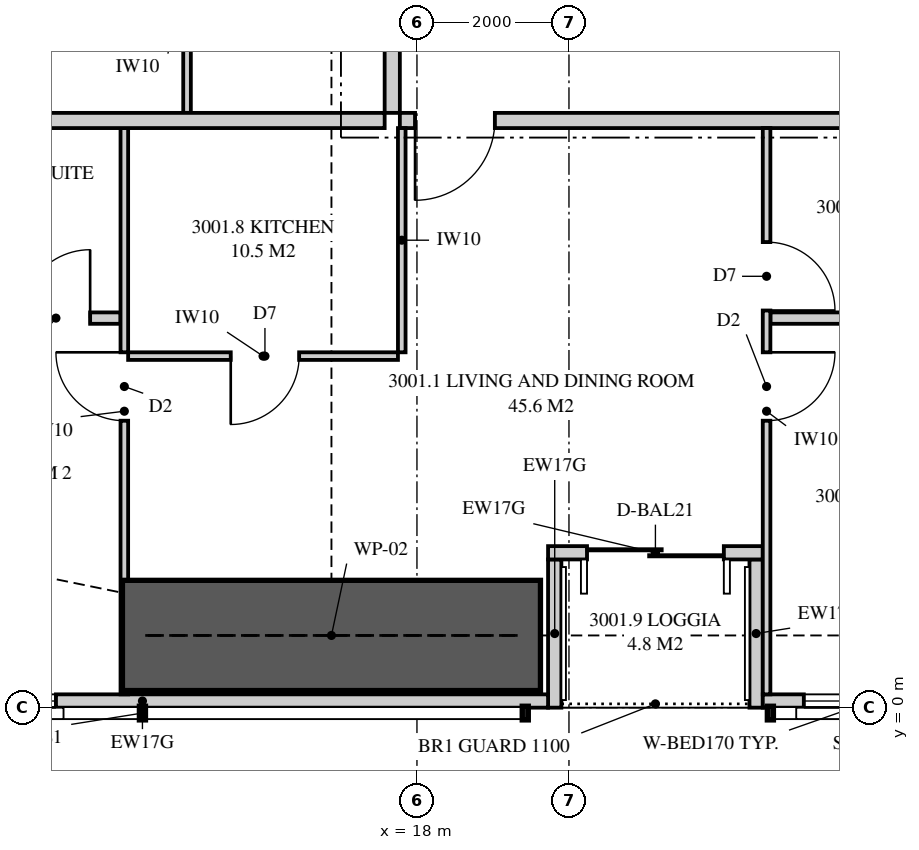
"""IFC4 building model, lengths in metres.
Left out: names, types, materials, properties, quantities, classifications, styles, units other than length and angle.
Written with IfcOpenShell. Run it as: python <this file> out.ifc"""

import sys

from ifc_helpers import new_model, si_unit, direction, frame, frame_2d, origin, place, context, subcontext, project, spatial, polyline, rectangle, outline, extrude, element, fill, save


model = new_model("IFC4")
c1 = context("Model", 3, precision=1e-05, world=origin(), true_north=direction((0.0, 1.0)))
c2 = subcontext(c1, "Body", "Model", "MODEL_VIEW")
j1 = project(units=[si_unit("LENGTHUNIT", "METRE"), si_unit("PLANEANGLEUNIT", "RADIAN")], contexts=[c1])
p1 = place(None, origin())
s1 = spatial("IfcSite", under=j1, at=p1, CompositionType="ELEMENT")
p2 = place(p1, origin())
s2 = spatial("IfcBuilding", under=s1, at=p2, CompositionType="ELEMENT")
p3 = place(p2, frame((0.0, 0.0, 111.55)))
s3 = spatial("IfcBuildingStorey", under=s2, at=p3, CompositionType="ELEMENT", Elevation=111.55)
p4 = place(p3, frame((9.051, 0.087, 0.0), z_axis=(0.0, 0.0, 1.0), x_axis=(1.0, 0.0, 0.0)))
e1 = element("IfcWall", 1, at=p4, inside=s3, PredefinedType="SOLIDWALL", context=c2, shape_type="SweptSolid", body=[
    extrude(outline(polyline([(0.0, 0.0), (10.674, 0.0), (10.674, 2.15), (7.824, 2.15), (7.824, 3.11), (7.666, 3.11), (7.666, 2.15), (7.62, 2.15), (7.62, 3.11), (0.0, 3.11), (0.0, 0.0)])), frame((0.0, 0.087, 0.0), z_axis=(0.0, -1.0, 0.0), x_axis=(1.0, 0.0, 0.0)), (0.0, 0.0, 1.0), 0.175),
])
p5 = place(p4, frame((2.399, 0.0, 0.4)))
e2 = element("IfcOpeningElement", 2, at=p5, cuts=e1, PredefinedType="OPENING", context=c2, shape_type="SweptSolid", body=[
    extrude(rectangle(XDim=1.8, YDim=1.7, at=frame_2d((0.9, 0.85))), frame((0.0, 0.097, 0.0), z_axis=(0.0, -1.0, 0.0), x_axis=(1.0, 0.0, 0.0)), (0.0, 0.0, 1.0), 0.195),
])
p6 = place(p3, frame((22.55, 0.087, 0.0), z_axis=(0.0, 0.0, 1.0), x_axis=(1.0, 0.0, 0.0)))
e3 = element("IfcWall", 3, at=p6, inside=s3, PredefinedType="SOLIDWALL", context=c2, shape_type="SweptSolid", body=[
    extrude(rectangle(XDim=8.3, YDim=0.175, at=frame_2d((4.15, 0.0))), origin(), (0.0, 0.0, 1.0), 2.15),
])
p7 = place(p6, frame((0.54, 0.0, 0.4)))
e4 = element("IfcOpeningElement", 4, at=p7, cuts=e3, PredefinedType="OPENING", context=c2, shape_type="SweptSolid", body=[
    extrude(rectangle(XDim=1.8, YDim=1.7, at=frame_2d((0.9, 0.85))), frame((0.0, 0.097, 0.0), z_axis=(0.0, -1.0, 0.0), x_axis=(1.0, 0.0, 0.0)), (0.0, 0.0, 1.0), 0.195),
])
p8 = place(p3, frame((19.725, 2.038, 0.0), z_axis=(0.0, 0.0, 1.0), x_axis=(1.0, 0.0, 0.0)))
e5 = element("IfcWall", 5, at=p8, inside=s3, PredefinedType="SOLIDWALL", context=c2, shape_type="SweptSolid", body=[
    extrude(rectangle(XDim=2.825, YDim=0.175, at=frame_2d((1.413, 0.0))), origin(), (0.0, 0.0, 1.0), 3.11),
])
p9 = place(p8, frame((0.512, 0.0, 0.0)))
e6 = element("IfcOpeningElement", 6, at=p9, cuts=e5, PredefinedType="OPENING", context=c2, shape_type="SweptSolid", body=[
    extrude(rectangle(XDim=1.8, YDim=2.1, at=frame_2d((0.9, 1.05))), frame((0.0, 0.097, 0.0), z_axis=(0.0, -1.0, 0.0), x_axis=(1.0, 0.0, 0.0)), (0.0, 0.0, 1.0), 0.195),
])
for number, where, z_axis, x_axis in (
    (7, (19.812, 0.0, 0.0), (0.0, 0.0, 1.0), (0.0, 1.0, 0.0)),
    (8, (22.462, 0.0, 0.0), (0.0, 0.0, 1.0), (0.0, 1.0, 0.0)),
):
    element("IfcWall", number, at=place(p3, frame(where, z_axis=z_axis, x_axis=x_axis)), inside=s3, PredefinedType="SOLIDWALL", context=c2, shape_type="SweptSolid", body=[
        extrude(outline(polyline([(0.0, 0.0), (1.95, 0.0), (1.95, 3.11), (1.75, 3.11), (1.75, 2.15), (0.15, 2.15), (0.15, 3.11), (0.0, 3.11), (0.0, 0.0)])), frame((0.0, 0.087, 0.0), z_axis=(0.0, -1.0, 0.0), x_axis=(1.0, 0.0, 0.0)), (0.0, 0.0, 1.0), 0.175),
    ])
p10 = place(p3, frame((17.775, 7.725, 0.0), z_axis=(0.0, 0.0, 1.0), x_axis=(1.0, 0.0, 0.0)))
e9 = element("IfcWall", 9, at=p10, inside=s3, PredefinedType="PARTITIONING", context=c2, shape_type="SweptSolid", body=[
    extrude(rectangle(XDim=8.225, YDim=0.2, at=frame_2d((4.113, 0.0))), origin(), (0.0, 0.0, 1.0), 3.11),
])
p11 = place(p10, frame((0.2, 0.0, 0.0)))
e10 = element("IfcOpeningElement", 10, at=p11, cuts=e9, PredefinedType="OPENING", context=c2, shape_type="SweptSolid", body=[
    extrude(rectangle(XDim=1.05, YDim=2.2, at=frame_2d((0.525, 1.1))), frame((0.0, 0.11, 0.0), z_axis=(0.0, -1.0, 0.0), x_axis=(1.0, 0.0, 0.0)), (0.0, 0.0, 1.0), 0.22),
])
p12 = place(p3, frame((14.15, 0.175, 0.0), z_axis=(0.0, 0.0, 1.0), x_axis=(0.0, 1.0, 0.0)))
e11 = element("IfcWall", 11, at=p12, inside=s3, PredefinedType="PARTITIONING", context=c2, shape_type="SweptSolid", body=[
    extrude(outline(polyline([(0.0, 0.0), (7.45, 0.0), (7.45, 3.11), (2.208, 3.11), (2.208, 2.15), (0.453, 2.15), (0.453, 3.11), (0.0, 3.11), (0.0, 0.0)])), frame((0.0, 0.05, 0.0), z_axis=(0.0, -1.0, 0.0), x_axis=(1.0, 0.0, 0.0)), (0.0, 0.0, 1.0), 0.1),
])
p13 = place(p12, frame((3.6, 0.0, 0.0)))
e12 = element("IfcOpeningElement", 12, at=p13, cuts=e11, PredefinedType="OPENING", context=c2, shape_type="SweptSolid", body=[
    extrude(rectangle(XDim=0.9, YDim=2.1, at=frame_2d((0.45, 1.05))), frame((0.0, 0.06, 0.0), z_axis=(0.0, -1.0, 0.0), x_axis=(1.0, 0.0, 0.0)), (0.0, 0.0, 1.0), 0.12),
])
p14 = place(p3, frame((22.6, 0.175, 0.0), z_axis=(0.0, 0.0, 1.0), x_axis=(0.0, 1.0, 0.0)))
e13 = element("IfcWall", 13, at=p14, inside=s3, PredefinedType="PARTITIONING", context=c2, shape_type="SweptSolid", body=[
    extrude(outline(polyline([(0.0, 0.0), (7.45, 0.0), (7.45, 3.11), (1.635, 3.11), (1.635, 2.15), (0.0, 2.15), (0.0, 3.11), (0.0, 0.0)])), frame((0.0, 0.05, 0.0), z_axis=(0.0, -1.0, 0.0), x_axis=(1.0, 0.0, 0.0)), (0.0, 0.0, 1.0), 0.1),
])
p15 = place(p14, frame((3.6, 0.0, 0.0)))
e14 = element("IfcOpeningElement", 14, at=p15, cuts=e13, PredefinedType="OPENING", context=c2, shape_type="SweptSolid", body=[
    extrude(rectangle(XDim=0.9, YDim=2.1, at=frame_2d((0.45, 1.05))), frame((0.0, 0.06, 0.0), z_axis=(0.0, -1.0, 0.0), x_axis=(1.0, 0.0, 0.0)), (0.0, 0.0, 1.0), 0.12),
])
p16 = place(p14, frame((5.05, 0.0, 0.0)))
e15 = element("IfcOpeningElement", 15, at=p16, cuts=e13, PredefinedType="OPENING", context=c2, shape_type="SweptSolid", body=[
    extrude(rectangle(XDim=0.9, YDim=2.1, at=frame_2d((0.45, 1.05))), frame((0.0, 0.06, 0.0), z_axis=(0.0, -1.0, 0.0), x_axis=(1.0, 0.0, 0.0)), (0.0, 0.0, 1.0), 0.12),
])
p17 = place(p3, frame((10.6, 5.125, 0.0), z_axis=(0.0, 0.0, 1.0), x_axis=(1.0, 0.0, 0.0)))
e16 = element("IfcWall", 16, at=p17, inside=s3, PredefinedType="PLUMBINGWALL", context=c2, shape_type="SweptSolid", body=[
    extrude(outline(polyline([(0.0, 0.0), (3.5, 0.0), (3.5, 3.11), (0.885, 3.11), (0.885, 2.51), (0.0, 2.51), (0.0, 3.11), (0.0, 0.0)])), frame((0.0, 0.075, 0.0), z_axis=(0.0, -1.0, 0.0), x_axis=(1.0, 0.0, 0.0)), (0.0, 0.0, 1.0), 0.15),
])
p18 = place(p17, frame((2.2, 0.0, 0.0)))
e17 = element("IfcOpeningElement", 17, at=p18, cuts=e16, PredefinedType="OPENING", context=c2, shape_type="SweptSolid", body=[
    extrude(rectangle(XDim=0.9, YDim=2.1, at=frame_2d((0.45, 1.05))), frame((0.0, 0.085, 0.0), z_axis=(0.0, -1.0, 0.0), x_axis=(1.0, 0.0, 0.0)), (0.0, 0.0, 1.0), 0.17),
])
p19 = place(p3, frame((22.65, 5.125, 0.0), z_axis=(0.0, 0.0, 1.0), x_axis=(1.0, 0.0, 0.0)))
e18 = element("IfcWall", 18, at=p19, inside=s3, PredefinedType="PLUMBINGWALL", context=c2, shape_type="SweptSolid", body=[
    extrude(rectangle(XDim=3.35, YDim=0.15, at=frame_2d((1.675, 0.0))), origin(), (0.0, 0.0, 1.0), 3.11),
])
p20 = place(p3, frame((14.2, 4.625, 0.0), z_axis=(0.0, 0.0, 1.0), x_axis=(1.0, 0.0, 0.0)))
e19 = element("IfcWall", 19, at=p20, inside=s3, PredefinedType="PARTITIONING", context=c2, shape_type="SweptSolid", body=[
    extrude(outline(polyline([(0.0, 0.0), (3.55, 0.0), (3.55, 3.11), (2.962, 3.11), (2.962, 2.541), (2.388, 2.541), (2.388, 3.11), (0.0, 3.11), (0.0, 0.0)])), frame((0.0, 0.05, 0.0), z_axis=(0.0, -1.0, 0.0), x_axis=(1.0, 0.0, 0.0)), (0.0, 0.0, 1.0), 0.1),
])
p21 = place(p20, frame((1.35, 0.0, 0.0)))
e20 = element("IfcOpeningElement", 20, at=p21, cuts=e19, PredefinedType="OPENING", context=c2, shape_type="SweptSolid", body=[
    extrude(rectangle(XDim=0.9, YDim=2.1, at=frame_2d((0.45, 1.05))), frame((0.0, 0.06, 0.0), z_axis=(0.0, -1.0, 0.0), x_axis=(1.0, 0.0, 0.0)), (0.0, 0.0, 1.0), 0.12),
])
p22 = place(p3, frame((17.8, 4.675, 0.0), z_axis=(0.0, 0.0, 1.0), x_axis=(0.0, 1.0, 0.0)))
e21 = element("IfcWall", 21, at=p22, inside=s3, PredefinedType="PARTITIONING", context=c2, shape_type="SweptSolid", body=[
    extrude(rectangle(XDim=2.95, YDim=0.1, at=frame_2d((1.475, 0.0))), origin(), (0.0, 0.0, 1.0), 3.11),
])
p23 = place(p3, frame((6.0, 7.725, 0.0), z_axis=(0.0, 0.0, 1.0), x_axis=(1.0, 0.0, 0.0)))
e22 = element("IfcWall", 22, at=p23, inside=s3, PredefinedType="PARTITIONING", context=c2, shape_type="SweptSolid", body=[
    extrude(outline(polyline([(0.0, 0.0), (11.575, 0.0), (11.575, 3.11), (11.212, 3.11), (11.212, 2.541), (10.538, 2.541), (10.538, 3.11), (5.51, 3.11), (5.51, 2.51), (2.969, 2.51), (2.969, 2.541), (2.727, 2.541), (2.727, 2.15), (0.884, 2.15), (0.884, 3.11), (0.0, 3.11), (0.0, 0.0)])), frame((0.0, 0.1, 0.0), z_axis=(0.0, -1.0, 0.0), x_axis=(1.0, 0.0, 0.0)), (0.0, 0.0, 1.0), 0.2),
])
p24 = place(p3, frame((17.675, 7.825, 0.0), z_axis=(0.0, 0.0, 1.0), x_axis=(0.0, 1.0, 0.0)))
e23 = element("IfcWall", 23, at=p24, inside=s3, PredefinedType="PARTITIONING", context=c2, shape_type="SweptSolid", body=[
    extrude(outline(polyline([(0.0, 0.0), (6.637, 0.0), (6.637, 3.11), (3.087, 3.11), (3.087, 2.541), (2.413, 2.541), (2.413, 3.11), (0.0, 3.11), (0.0, 0.0)])), frame((0.0, 0.1, 0.0), z_axis=(0.0, -1.0, 0.0), x_axis=(1.0, 0.0, 0.0)), (0.0, 0.0, 1.0), 0.2),
])
p25 = place(p3, frame((14.975, 7.825, 0.0), z_axis=(0.0, 0.0, 1.0), x_axis=(0.0, 1.0, 0.0)))
e24 = element("IfcWall", 24, at=p25, inside=s3, PredefinedType="PARTITIONING", context=c2, shape_type="SweptSolid", body=[
    extrude(outline(polyline([(0.0, 0.0), (3.45, 0.0), (3.45, 3.11), (3.037, 3.11), (3.037, 2.541), (2.463, 2.541), (2.463, 3.11), (0.0, 3.11), (0.0, 0.0)])), frame((0.0, 0.05, 0.0), z_axis=(0.0, -1.0, 0.0), x_axis=(1.0, 0.0, 0.0)), (0.0, 0.0, 1.0), 0.1),
])
p26 = place(p3, frame((14.125, 0.95, 0.0), z_axis=(0.0, 0.0, 1.0), x_axis=(1.0, 0.0, 0.0)))
e25 = element("IfcWall", 25, at=p26, inside=s3, PredefinedType="SHEAR", context=c2, shape_type="SweptSolid", body=[
    extrude(rectangle(XDim=5.5, YDim=1.45, at=frame_2d((2.75, 0.0))), origin(), (0.0, 0.0, 1.0), 3.35),
])
p27 = place(p5, origin())
e26 = element("IfcWindow", 26, at=p27, inside=s3, PartitioningType="SINGLE_PANEL", PredefinedType="WINDOW", context=c2, shape_type="SweptSolid", body=[
    extrude(rectangle(XDim=1.8, YDim=1.7, at=frame_2d((0.9, 0.85))), frame((0.0, 0.03, 0.0), z_axis=(0.0, -1.0, 0.0), x_axis=(1.0, 0.0, 0.0)), (0.0, 0.0, 1.0), 0.06),
])
fill(e2, e26)
p28 = place(p9, origin())
e27 = element("IfcDoor", 27, at=p28, inside=s3, OperationType="SLIDING_TO_LEFT", PredefinedType="DOOR", context=c2, shape_type="SweptSolid", body=[
    extrude(rectangle(XDim=1.8, YDim=2.1, at=frame_2d((0.9, 1.05))), frame((0.0, 0.025, 0.0), z_axis=(0.0, -1.0, 0.0), x_axis=(1.0, 0.0, 0.0)), (0.0, 0.0, 1.0), 0.05),
])
fill(e6, e27)
p29 = place(p7, origin())
e28 = element("IfcWindow", 28, at=p29, inside=s3, PartitioningType="SINGLE_PANEL", PredefinedType="WINDOW", context=c2, shape_type="SweptSolid", body=[
    extrude(rectangle(XDim=1.8, YDim=1.7, at=frame_2d((0.9, 0.85))), frame((0.0, 0.03, 0.0), z_axis=(0.0, -1.0, 0.0), x_axis=(1.0, 0.0, 0.0)), (0.0, 0.0, 1.0), 0.06),
])
fill(e4, e28)
p30 = place(p11, frame((1.05, 0.0, 0.0), z_axis=(0.0, 0.0, 1.0), x_axis=(-1.0, 0.0, 0.0)))
e29 = element("IfcDoor", 29, at=p30, inside=s3, OperationType="SINGLE_SWING_RIGHT", PredefinedType="DOOR", context=c2, shape_type="SweptSolid", body=[
    extrude(rectangle(XDim=1.05, YDim=2.2, at=frame_2d((0.525, 1.1))), frame((0.0, 0.025, 0.0), z_axis=(0.0, -1.0, 0.0), x_axis=(1.0, 0.0, 0.0)), (0.0, 0.0, 1.0), 0.05),
])
fill(e10, e29)
p31 = place(p13, origin())
e30 = element("IfcDoor", 30, at=p31, inside=s3, OperationType="SINGLE_SWING_RIGHT", PredefinedType="DOOR", context=c2, shape_type="SweptSolid", body=[
    extrude(rectangle(XDim=0.9, YDim=2.1, at=frame_2d((0.45, 1.05))), frame((0.0, 0.025, 0.0), z_axis=(0.0, -1.0, 0.0), x_axis=(1.0, 0.0, 0.0)), (0.0, 0.0, 1.0), 0.05),
])
fill(e12, e30)
p32 = place(p18, origin())
e31 = element("IfcDoor", 31, at=p32, inside=s3, OperationType="SINGLE_SWING_RIGHT", PredefinedType="DOOR", context=c2, shape_type="SweptSolid", body=[
    extrude(rectangle(XDim=0.9, YDim=2.1, at=frame_2d((0.45, 1.05))), frame((0.0, 0.025, 0.0), z_axis=(0.0, -1.0, 0.0), x_axis=(1.0, 0.0, 0.0)), (0.0, 0.0, 1.0), 0.05),
])
fill(e17, e31)
p33 = place(p15, frame((0.9, 0.0, 0.0), z_axis=(0.0, 0.0, 1.0), x_axis=(-1.0, 0.0, 0.0)))
e32 = element("IfcDoor", 32, at=p33, inside=s3, OperationType="SINGLE_SWING_LEFT", PredefinedType="DOOR", context=c2, shape_type="SweptSolid", body=[
    extrude(rectangle(XDim=0.9, YDim=2.1, at=frame_2d((0.45, 1.05))), frame((0.0, 0.025, 0.0), z_axis=(0.0, -1.0, 0.0), x_axis=(1.0, 0.0, 0.0)), (0.0, 0.0, 1.0), 0.05),
])
fill(e14, e32)
p34 = place(p16, frame((0.9, 0.0, 0.0), z_axis=(0.0, 0.0, 1.0), x_axis=(-1.0, 0.0, 0.0)))
e33 = element("IfcDoor", 33, at=p34, inside=s3, OperationType="SINGLE_SWING_RIGHT", PredefinedType="DOOR", context=c2, shape_type="SweptSolid", body=[
    extrude(rectangle(XDim=0.9, YDim=2.1, at=frame_2d((0.45, 1.05))), frame((0.0, 0.025, 0.0), z_axis=(0.0, -1.0, 0.0), x_axis=(1.0, 0.0, 0.0)), (0.0, 0.0, 1.0), 0.05),
])
fill(e15, e33)
p35 = place(p21, frame((0.9, 0.0, 0.0), z_axis=(0.0, 0.0, 1.0), x_axis=(-1.0, 0.0, 0.0)))
e34 = element("IfcDoor", 34, at=p35, inside=s3, OperationType="SINGLE_SWING_RIGHT", PredefinedType="DOOR", context=c2, shape_type="SweptSolid", body=[
    extrude(rectangle(XDim=0.9, YDim=2.1, at=frame_2d((0.45, 1.05))), frame((0.0, 0.025, 0.0), z_axis=(0.0, -1.0, 0.0), x_axis=(1.0, 0.0, 0.0)), (0.0, 0.0, 1.0), 0.05),
])
fill(e20, e34)
save(model, sys.argv[1])
